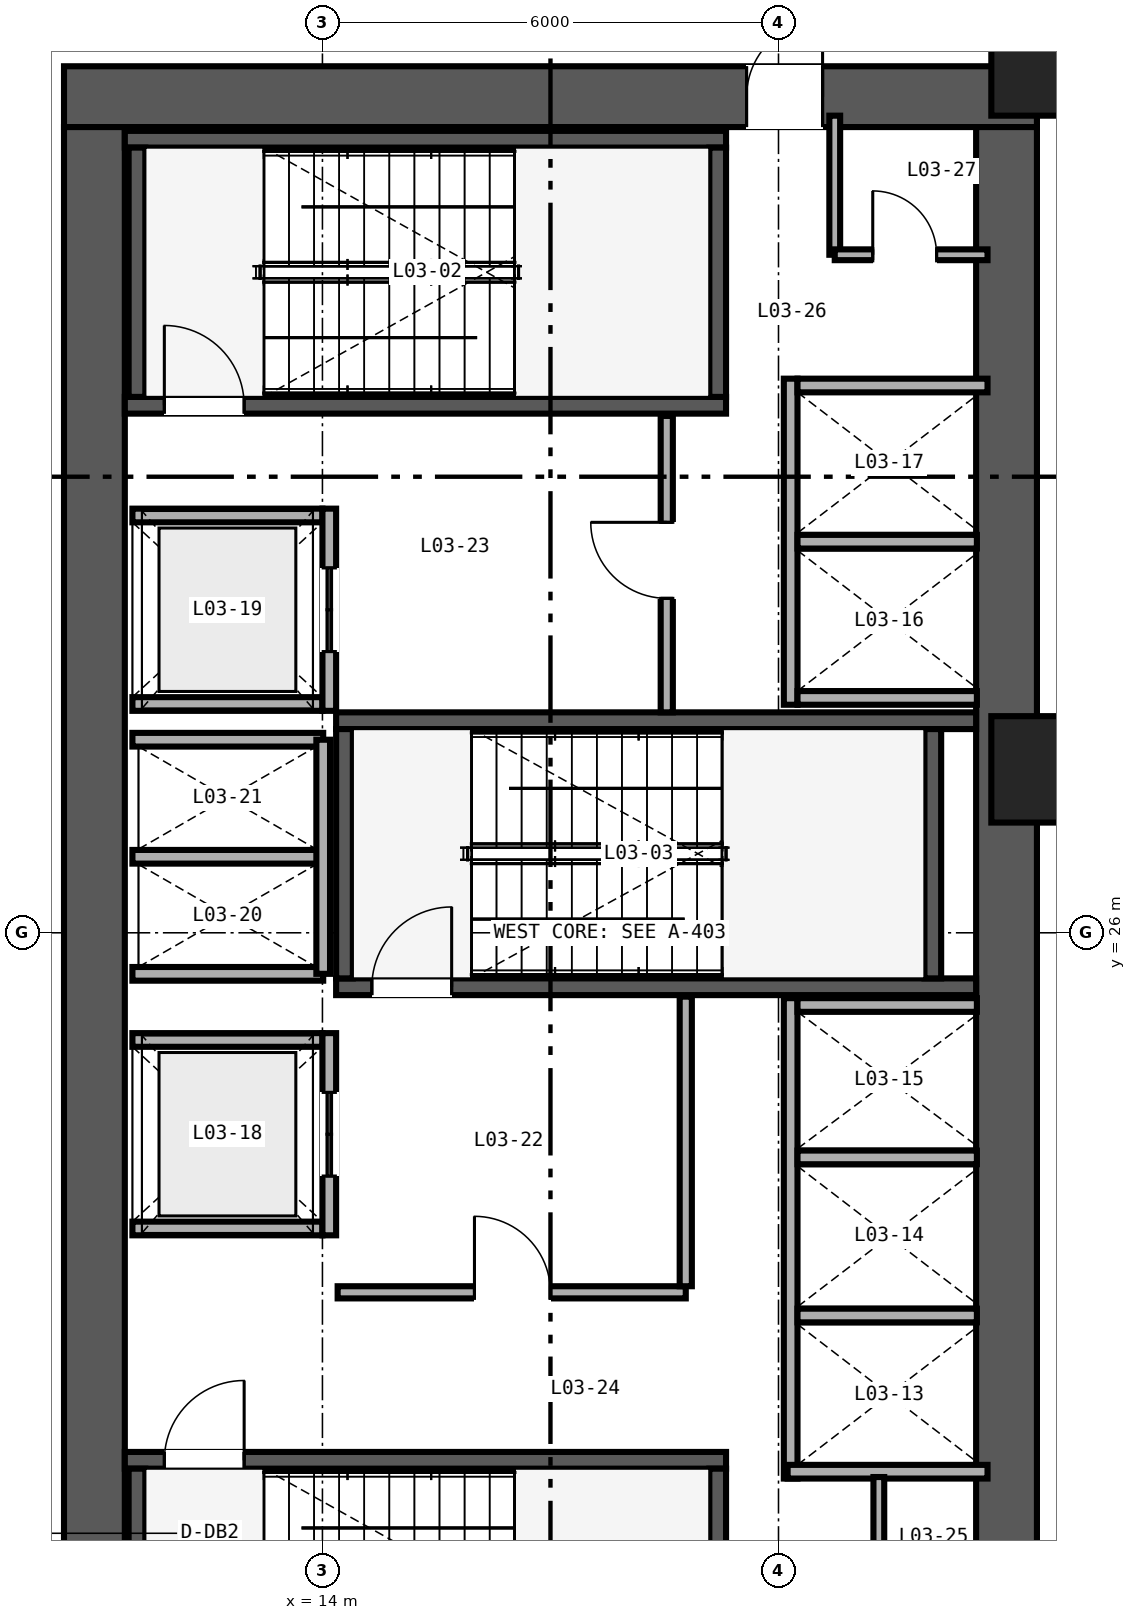
"""IFC4 building model, lengths in metres.
Left out: names, types, materials, properties, quantities, classifications, styles, units other than length and angle.
Written with IfcOpenShell. Run it as: python <this file> out.ifc"""

import sys

from ifc_helpers import new_model, si_unit, direction, frame, frame_2d, origin, origin_2d, place, context, subcontext, project, spatial, rectangle, extrude, source, transform, mapped, element, fill, save


model = new_model("IFC4")
c1 = context("Model", 3, precision=1e-05, world=origin(), true_north=direction((0.0, 1.0)))
c2 = subcontext(c1, "Body", "Model", "MODEL_VIEW")
j1 = project(units=[si_unit("LENGTHUNIT", "METRE"), si_unit("PLANEANGLEUNIT", "RADIAN")], contexts=[c1])
p1 = place(None, origin())
s1 = spatial("IfcSite", under=j1, at=p1, CompositionType="ELEMENT")
p2 = place(p1, origin())
s2 = spatial("IfcBuilding", under=s1, at=p2, CompositionType="ELEMENT")
p3 = place(p2, frame((0.0, 0.0, 11.4)))
s3 = spatial("IfcBuildingStorey", under=s2, at=p3, CompositionType="ELEMENT", Elevation=11.4)
p4 = place(p3, frame((10.6, 37.0, 0.0), z_axis=(0.0, 0.0, 1.0), x_axis=(1.0, 0.0, 0.0)))
e1 = element("IfcWall", 1, at=p4, inside=s3, PredefinedType="SHEAR", context=c2, shape_type="SweptSolid", body=[
    extrude(rectangle(XDim=12.8, YDim=0.8, at=frame_2d((6.4, 0.0))), origin(), (0.0, 0.0, 1.0), 7.51),
])
p5 = place(p4, frame((8.98, 0.0, 0.0)))
e2 = element("IfcOpeningElement", 2, at=p5, cuts=e1, PredefinedType="OPENING", context=c2, shape_type="SweptSolid", body=[
    extrude(rectangle(XDim=1.0, YDim=2.15, at=frame_2d((0.5, 1.075))), frame((0.0, 0.41, 0.0), z_axis=(0.0, -1.0, 0.0), x_axis=(1.0, 0.0, 0.0)), (0.0, 0.0, 1.0), 0.82),
])
for number, where, z_axis, x_axis in (
    (3, (11.0, 15.4, 0.0), (0.0, 0.0, 1.0), (0.0, 1.0, 0.0)),
    (4, (23.0, 15.4, 0.0), (0.0, 0.0, 1.0), (0.0, 1.0, 0.0)),
):
    element("IfcWall", number, at=place(p3, frame(where, z_axis=z_axis, x_axis=x_axis)), inside=s3, PredefinedType="SHEAR", context=c2, shape_type="SweptSolid", body=[
        extrude(rectangle(XDim=21.2, YDim=0.8, at=frame_2d((10.6, 0.0))), origin(), (0.0, 0.0, 1.0), 7.51),
    ])
p6 = place(p3, frame((11.4, 19.06, 0.0), z_axis=(0.0, 0.0, 1.0), x_axis=(1.0, 0.0, 0.0)))
e5 = element("IfcWall", 5, at=p6, inside=s3, PredefinedType="SHEAR", context=c2, shape_type="SweptSolid", body=[
    extrude(rectangle(XDim=7.91, YDim=0.22, at=frame_2d((3.955, 0.0))), origin(), (0.0, 0.0, 1.0), 7.6),
])
p7 = place(p6, frame((0.52, 0.0, 0.0)))
e6 = element("IfcOpeningElement", 6, at=p7, cuts=e5, PredefinedType="OPENING", context=c2, shape_type="SweptSolid", body=[
    extrude(rectangle(XDim=1.05, YDim=2.15, at=frame_2d((0.525, 1.075))), frame((0.0, 0.12, 0.0), z_axis=(0.0, -1.0, 0.0), x_axis=(1.0, 0.0, 0.0)), (0.0, 0.0, 1.0), 0.24),
])
for number, where, z_axis, x_axis in (
    (7, (11.56, 15.67, 0.0), (0.0, 0.0, 1.0), (0.0, 1.0, 0.0)),
    (8, (19.2, 15.67, 0.0), (0.0, 0.0, 1.0), (0.0, 1.0, 0.0)),
):
    element("IfcWall", number, at=place(p3, frame(where, z_axis=z_axis, x_axis=x_axis)), inside=s3, PredefinedType="SHEAR", context=c2, shape_type="SweptSolid", body=[
        extrude(rectangle(XDim=3.28, YDim=0.22, at=frame_2d((1.64, 0.0))), origin(), (0.0, 0.0, 1.0), 7.6),
    ])
p8 = place(p3, frame((11.4, 32.94, 0.0), z_axis=(0.0, 0.0, 1.0), x_axis=(1.0, 0.0, 0.0)))
e9 = element("IfcWall", 9, at=p8, inside=s3, PredefinedType="SHEAR", context=c2, shape_type="SweptSolid", body=[
    extrude(rectangle(XDim=7.91, YDim=0.22, at=frame_2d((3.955, 0.0))), origin(), (0.0, 0.0, 1.0), 7.6),
])
p9 = place(p8, frame((0.52, 0.0, 0.0)))
e10 = element("IfcOpeningElement", 10, at=p9, cuts=e9, PredefinedType="OPENING", context=c2, shape_type="SweptSolid", body=[
    extrude(rectangle(XDim=1.05, YDim=2.15, at=frame_2d((0.525, 1.075))), frame((0.0, 0.12, 0.0), z_axis=(0.0, -1.0, 0.0), x_axis=(1.0, 0.0, 0.0)), (0.0, 0.0, 1.0), 0.24),
])
p10 = place(p3, frame((11.4, 36.44, 0.0), z_axis=(0.0, 0.0, 1.0), x_axis=(1.0, 0.0, 0.0)))
e11 = element("IfcWall", 11, at=p10, inside=s3, PredefinedType="SHEAR", context=c2, shape_type="SweptSolid", body=[
    extrude(rectangle(XDim=7.91, YDim=0.22, at=frame_2d((3.955, 0.0))), origin(), (0.0, 0.0, 1.0), 7.6),
])
for number, where, z_axis, x_axis in (
    (12, (11.56, 33.05, 0.0), (0.0, 0.0, 1.0), (0.0, 1.0, 0.0)),
    (13, (19.2, 33.05, 0.0), (0.0, 0.0, 1.0), (0.0, 1.0, 0.0)),
):
    element("IfcWall", number, at=place(p3, frame(where, z_axis=z_axis, x_axis=x_axis)), inside=s3, PredefinedType="SHEAR", context=c2, shape_type="SweptSolid", body=[
        extrude(rectangle(XDim=3.28, YDim=0.22, at=frame_2d((1.64, 0.0))), origin(), (0.0, 0.0, 1.0), 7.6),
    ])
p11 = place(p3, frame((14.18, 25.29, 0.0), z_axis=(0.0, 0.0, 1.0), x_axis=(1.0, 0.0, 0.0)))
e14 = element("IfcWall", 14, at=p11, inside=s3, PredefinedType="SHEAR", context=c2, shape_type="SweptSolid", body=[
    extrude(rectangle(XDim=8.42, YDim=0.22, at=frame_2d((4.21, 0.0))), origin(), (0.0, 0.0, 1.0), 7.6),
])
p12 = place(p11, frame((0.47, 0.0, 0.0)))
e15 = element("IfcOpeningElement", 15, at=p12, cuts=e14, PredefinedType="OPENING", context=c2, shape_type="SweptSolid", body=[
    extrude(rectangle(XDim=1.05, YDim=2.15, at=frame_2d((0.525, 1.075))), frame((0.0, 0.12, 0.0), z_axis=(0.0, -1.0, 0.0), x_axis=(1.0, 0.0, 0.0)), (0.0, 0.0, 1.0), 0.24),
])
p13 = place(p3, frame((14.18, 28.79, 0.0), z_axis=(0.0, 0.0, 1.0), x_axis=(1.0, 0.0, 0.0)))
e16 = element("IfcWall", 16, at=p13, inside=s3, PredefinedType="SHEAR", context=c2, shape_type="SweptSolid", body=[
    extrude(rectangle(XDim=8.42, YDim=0.22, at=frame_2d((4.21, 0.0))), origin(), (0.0, 0.0, 1.0), 7.6),
])
for number, where, z_axis, x_axis in (
    (17, (14.29, 25.4, 0.0), (0.0, 0.0, 1.0), (0.0, 1.0, 0.0)),
    (18, (22.03, 25.4, 0.0), (0.0, 0.0, 1.0), (0.0, 1.0, 0.0)),
):
    element("IfcWall", number, at=place(p3, frame(where, z_axis=z_axis, x_axis=x_axis)), inside=s3, PredefinedType="SHEAR", context=c2, shape_type="SweptSolid", body=[
        extrude(rectangle(XDim=3.28, YDim=0.22, at=frame_2d((1.64, 0.0))), origin(), (0.0, 0.0, 1.0), 7.6),
    ])
m1 = source(origin(), c2, "Body", "SweptSolid", [
    extrude(rectangle(XDim=1.4, YDim=1.4, at=origin_2d()), origin(), (0.0, 0.0, 1.0), 7.51),
])
for number, where, z_axis, x_axis in (
    (19, (23.5, 28.15, 0.0), (0.0, 0.0, 1.0), (1.0, 0.0, 0.0)),
    (20, (23.5, 37.45, 0.0), (0.0, 0.0, 1.0), (1.0, 0.0, 0.0)),
):
    element("IfcColumn", number, at=place(p3, frame(where, z_axis=z_axis, x_axis=x_axis)), inside=s3, PredefinedType="COLUMN", context=c2, shape_type="MappedRepresentation", body=[
        mapped(m1, transform((0.0, 0.0, 0.0), scale=1.0)),
    ])
p14 = place(p3, frame((20.16, 18.82, 0.0), z_axis=(0.0, 0.0, 1.0), x_axis=(0.0, 1.0, 0.0)))
e21 = element("IfcWall", 21, at=p14, inside=s3, PredefinedType="SOLIDWALL", context=c2, shape_type="SweptSolid", body=[
    extrude(rectangle(XDim=6.32, YDim=0.18, at=frame_2d((3.16, 0.0))), origin(), (0.0, 0.0, 1.0), 6.41),
])
p15 = place(p3, frame((20.12, 18.91, 0.0), z_axis=(0.0, 0.0, 1.0), x_axis=(1.0, 0.0, 0.0)))
e22 = element("IfcWall", 22, at=p15, inside=s3, PredefinedType="SOLIDWALL", context=c2, shape_type="SweptSolid", body=[
    extrude(rectangle(XDim=2.63, YDim=0.18, at=frame_2d((1.315, 0.0))), origin(), (0.0, 0.0, 1.0), 7.51),
])
p16 = place(p3, frame((20.25, 25.05, 0.0), z_axis=(0.0, 0.0, 1.0), x_axis=(1.0, 0.0, 0.0)))
e23 = element("IfcWall", 23, at=p16, inside=s3, PredefinedType="SOLIDWALL", context=c2, shape_type="SweptSolid", body=[
    extrude(rectangle(XDim=2.36, YDim=0.18, at=frame_2d((1.18, 0.0))), origin(), (0.0, 0.0, 1.0), 7.51),
])
p17 = place(p3, frame((20.25, 20.965, 0.0), z_axis=(0.0, 0.0, 1.0), x_axis=(1.0, 0.0, 0.0)))
e24 = element("IfcWall", 24, at=p17, inside=s3, PredefinedType="SOLIDWALL", context=c2, shape_type="SweptSolid", body=[
    extrude(rectangle(XDim=2.36, YDim=0.18, at=frame_2d((1.18, 0.0))), origin(), (0.0, 0.0, 1.0), 6.41),
])
p18 = place(p3, frame((20.25, 23.045, 0.0), z_axis=(0.0, 0.0, 1.0), x_axis=(1.0, 0.0, 0.0)))
e25 = element("IfcWall", 25, at=p18, inside=s3, PredefinedType="SOLIDWALL", context=c2, shape_type="SweptSolid", body=[
    extrude(rectangle(XDim=2.36, YDim=0.18, at=frame_2d((1.18, 0.0))), origin(), (0.0, 0.0, 1.0), 7.51),
])
p19 = place(p3, frame((20.16, 29.0, 0.0), z_axis=(0.0, 0.0, 1.0), x_axis=(0.0, 1.0, 0.0)))
e26 = element("IfcWall", 26, at=p19, inside=s3, PredefinedType="SOLIDWALL", context=c2, shape_type="SweptSolid", body=[
    extrude(rectangle(XDim=4.29, YDim=0.18, at=frame_2d((2.145, 0.0))), origin(), (0.0, 0.0, 1.0), 7.51),
])
p20 = place(p3, frame((20.25, 29.09, 0.0), z_axis=(0.0, 0.0, 1.0), x_axis=(1.0, 0.0, 0.0)))
e27 = element("IfcWall", 27, at=p20, inside=s3, PredefinedType="SOLIDWALL", context=c2, shape_type="SweptSolid", body=[
    extrude(rectangle(XDim=2.36, YDim=0.18, at=frame_2d((1.18, 0.0))), origin(), (0.0, 0.0, 1.0), 7.51),
])
p21 = place(p3, frame((20.25, 33.2, 0.0), z_axis=(0.0, 0.0, 1.0), x_axis=(1.0, 0.0, 0.0)))
e28 = element("IfcWall", 28, at=p21, inside=s3, PredefinedType="SOLIDWALL", context=c2, shape_type="SweptSolid", body=[
    extrude(rectangle(XDim=2.5, YDim=0.18, at=frame_2d((1.25, 0.0))), origin(), (0.0, 0.0, 1.0), 7.51),
])
p22 = place(p3, frame((20.25, 31.145, 0.0), z_axis=(0.0, 0.0, 1.0), x_axis=(1.0, 0.0, 0.0)))
e29 = element("IfcWall", 29, at=p22, inside=s3, PredefinedType="SOLIDWALL", context=c2, shape_type="SweptSolid", body=[
    extrude(rectangle(XDim=2.36, YDim=0.18, at=frame_2d((1.18, 0.0))), origin(), (0.0, 0.0, 1.0), 7.51),
])
for number, where, z_axis, x_axis in (
    (30, (11.5, 22.11, 0.0), (0.0, 0.0, 1.0), (1.0, 0.0, 0.0)),
    (31, (11.5, 24.59, 0.0), (0.0, 0.0, 1.0), (1.0, 0.0, 0.0)),
):
    element("IfcWall", number, at=place(p3, frame(where, z_axis=z_axis, x_axis=x_axis)), inside=s3, PredefinedType="SOLIDWALL", context=c2, shape_type="SweptSolid", body=[
        extrude(rectangle(XDim=2.5, YDim=0.18, at=frame_2d((1.25, 0.0))), origin(), (0.0, 0.0, 1.0), 7.51),
    ])
p23 = place(p3, frame((14.09, 22.02, 0.0), z_axis=(0.0, 0.0, 1.0), x_axis=(0.0, 1.0, 0.0)))
e32 = element("IfcWall", 32, at=p23, inside=s3, PredefinedType="SOLIDWALL", context=c2, shape_type="SweptSolid", body=[
    extrude(rectangle(XDim=2.66, YDim=0.18, at=frame_2d((1.33, 0.0))), origin(), (0.0, 0.0, 1.0), 7.51),
])
p24 = place(p23, frame((0.78, 0.0, 0.0)))
e33 = element("IfcOpeningElement", 33, at=p24, cuts=e32, PredefinedType="OPENING", context=c2, shape_type="SweptSolid", body=[
    extrude(rectangle(XDim=1.1, YDim=2.2, at=frame_2d((0.55, 1.1))), frame((0.0, 0.1, 0.0), z_axis=(0.0, -1.0, 0.0), x_axis=(1.0, 0.0, 0.0)), (0.0, 0.0, 1.0), 0.2),
])
for number, where, z_axis, x_axis in (
    (34, (11.5, 29.01, 0.0), (0.0, 0.0, 1.0), (1.0, 0.0, 0.0)),
    (35, (11.5, 31.49, 0.0), (0.0, 0.0, 1.0), (1.0, 0.0, 0.0)),
):
    element("IfcWall", number, at=place(p3, frame(where, z_axis=z_axis, x_axis=x_axis)), inside=s3, PredefinedType="SOLIDWALL", context=c2, shape_type="SweptSolid", body=[
        extrude(rectangle(XDim=2.5, YDim=0.18, at=frame_2d((1.25, 0.0))), origin(), (0.0, 0.0, 1.0), 7.51),
    ])
p25 = place(p3, frame((14.09, 28.92, 0.0), z_axis=(0.0, 0.0, 1.0), x_axis=(0.0, 1.0, 0.0)))
e36 = element("IfcWall", 36, at=p25, inside=s3, PredefinedType="SOLIDWALL", context=c2, shape_type="SweptSolid", body=[
    extrude(rectangle(XDim=2.66, YDim=0.18, at=frame_2d((1.33, 0.0))), origin(), (0.0, 0.0, 1.0), 7.51),
])
p26 = place(p25, frame((0.78, 0.0, 0.0)))
e37 = element("IfcOpeningElement", 37, at=p26, cuts=e36, PredefinedType="OPENING", context=c2, shape_type="SweptSolid", body=[
    extrude(rectangle(XDim=1.1, YDim=2.2, at=frame_2d((0.55, 1.1))), frame((0.0, 0.1, 0.0), z_axis=(0.0, -1.0, 0.0), x_axis=(1.0, 0.0, 0.0)), (0.0, 0.0, 1.0), 0.2),
])
for number, where, z_axis, x_axis in (
    (38, (11.5, 25.46, 0.0), (0.0, 0.0, 1.0), (1.0, 0.0, 0.0)),
    (39, (11.5, 27.0, 0.0), (0.0, 0.0, 1.0), (1.0, 0.0, 0.0)),
    (40, (11.5, 28.54, 0.0), (0.0, 0.0, 1.0), (1.0, 0.0, 0.0)),
):
    element("IfcWall", number, at=place(p3, frame(where, z_axis=z_axis, x_axis=x_axis)), inside=s3, PredefinedType="SOLIDWALL", context=c2, shape_type="SweptSolid", body=[
        extrude(rectangle(XDim=2.51, YDim=0.18, at=frame_2d((1.255, 0.0))), origin(), (0.0, 0.0, 1.0), 7.51),
    ])
p27 = place(p3, frame((14.01, 25.46, 0.0), z_axis=(0.0, 0.0, 1.0), x_axis=(0.0, 1.0, 0.0)))
e41 = element("IfcWall", 41, at=p27, inside=s3, PredefinedType="SOLIDWALL", context=c2, shape_type="SweptSolid", body=[
    extrude(rectangle(XDim=3.08, YDim=0.18, at=frame_2d((1.54, 0.0))), origin(), (0.0, 0.0, 1.0), 7.51),
])
p28 = place(p3, frame((14.2, 21.27, 0.0), z_axis=(0.0, 0.0, 1.0), x_axis=(1.0, 0.0, 0.0)))
e42 = element("IfcWall", 42, at=p28, inside=s3, PredefinedType="PARTITIONING", context=c2, shape_type="SweptSolid", body=[
    extrude(rectangle(XDim=4.58, YDim=0.16, at=frame_2d((2.29, 0.0))), origin(), (0.0, 0.0, 1.0), 7.51),
])
p29 = place(p28, frame((1.8, 0.0, 0.0)))
e43 = element("IfcOpeningElement", 43, at=p29, cuts=e42, PredefinedType="OPENING", context=c2, shape_type="SweptSolid", body=[
    extrude(rectangle(XDim=1.0, YDim=2.15, at=frame_2d((0.5, 1.075))), frame((0.0, 0.09, 0.0), z_axis=(0.0, -1.0, 0.0), x_axis=(1.0, 0.0, 0.0)), (0.0, 0.0, 1.0), 0.18),
])
p30 = place(p3, frame((18.78, 21.35, 0.0), z_axis=(0.0, 0.0, 1.0), x_axis=(0.0, 1.0, 0.0)))
e44 = element("IfcWall", 44, at=p30, inside=s3, PredefinedType="PARTITIONING", context=c2, shape_type="SweptSolid", body=[
    extrude(rectangle(XDim=3.81, YDim=0.16, at=frame_2d((1.905, 0.0))), origin(), (0.0, 0.0, 1.0), 7.51),
])
p31 = place(p3, frame((18.53, 28.9, 0.0), z_axis=(0.0, 0.0, 1.0), x_axis=(0.0, 1.0, 0.0)))
e45 = element("IfcWall", 45, at=p31, inside=s3, PredefinedType="PARTITIONING", context=c2, shape_type="SweptSolid", body=[
    extrude(rectangle(XDim=3.9, YDim=0.16, at=frame_2d((1.95, 0.0))), origin(), (0.0, 0.0, 1.0), 7.51),
])
p32 = place(p31, frame((1.5, 0.0, 0.0)))
e46 = element("IfcOpeningElement", 46, at=p32, cuts=e45, PredefinedType="OPENING", context=c2, shape_type="SweptSolid", body=[
    extrude(rectangle(XDim=1.0, YDim=2.15, at=frame_2d((0.5, 1.075))), frame((0.0, 0.09, 0.0), z_axis=(0.0, -1.0, 0.0), x_axis=(1.0, 0.0, 0.0)), (0.0, 0.0, 1.0), 0.18),
])
p33 = place(p3, frame((21.32, 15.25, 0.0), z_axis=(0.0, 0.0, 1.0), x_axis=(0.0, 1.0, 0.0)))
e47 = element("IfcWall", 47, at=p33, inside=s3, PredefinedType="PARTITIONING", context=c2, shape_type="SweptSolid", body=[
    extrude(rectangle(XDim=3.59, YDim=0.142, at=frame_2d((1.795, 0.0))), origin(), (0.0, 0.0, 1.0), 7.51),
])
p34 = place(p33, frame((1.25, 0.0, 0.0)))
e48 = element("IfcOpeningElement", 48, at=p34, cuts=e47, PredefinedType="OPENING", context=c2, shape_type="SweptSolid", body=[
    extrude(rectangle(XDim=0.84, YDim=2.1, at=frame_2d((0.42, 1.05))), frame((0.0, 0.081, 0.0), z_axis=(0.0, -1.0, 0.0), x_axis=(1.0, 0.0, 0.0)), (0.0, 0.0, 1.0), 0.162),
])
p35 = place(p3, frame((20.74, 34.92, 0.0), z_axis=(0.0, 0.0, 1.0), x_axis=(0.0, 1.0, 0.0)))
e49 = element("IfcWall", 49, at=p35, inside=s3, PredefinedType="PARTITIONING", context=c2, shape_type="SweptSolid", body=[
    extrude(rectangle(XDim=1.83, YDim=0.142, at=frame_2d((0.915, 0.0))), origin(), (0.0, 0.0, 1.0), 7.51),
])
p36 = place(p3, frame((20.74, 34.92, 0.0), z_axis=(0.0, 0.0, 1.0), x_axis=(1.0, 0.0, 0.0)))
e50 = element("IfcWall", 50, at=p36, inside=s3, PredefinedType="PARTITIONING", context=c2, shape_type="SweptSolid", body=[
    extrude(rectangle(XDim=2.01, YDim=0.142, at=frame_2d((1.005, 0.0))), origin(), (0.0, 0.0, 1.0), 7.51),
])
p37 = place(p36, frame((0.5, 0.0, 0.0)))
e51 = element("IfcOpeningElement", 51, at=p37, cuts=e50, PredefinedType="OPENING", context=c2, shape_type="SweptSolid", body=[
    extrude(rectangle(XDim=0.84, YDim=2.1, at=frame_2d((0.42, 1.05))), frame((0.0, 0.081, 0.0), z_axis=(0.0, -1.0, 0.0), x_axis=(1.0, 0.0, 0.0)), (0.0, 0.0, 1.0), 0.162),
])
m2 = source(origin(), c2, "Body", "SweptSolid", [
    extrude(rectangle(XDim=1.05, YDim=2.15, at=frame_2d((0.525, 1.075))), frame((0.0, 0.025, 0.0), z_axis=(0.0, -1.0, 0.0), x_axis=(1.0, 0.0, 0.0)), (0.0, 0.0, 1.0), 0.05),
])
p38 = place(p7, origin())
e52 = element("IfcDoor", 52, at=p38, inside=s3, OperationType="SINGLE_SWING_RIGHT", PredefinedType="DOOR", context=c2, shape_type="MappedRepresentation", body=[
    mapped(m2, transform((0.0, 0.0, 0.0), scale=1.0)),
])
fill(e6, e52)
p39 = place(p9, origin())
e53 = element("IfcDoor", 53, at=p39, inside=s3, OperationType="SINGLE_SWING_LEFT", PredefinedType="DOOR", context=c2, shape_type="MappedRepresentation", body=[
    mapped(m2, transform((0.0, 0.0, 0.0), scale=1.0)),
])
fill(e10, e53)
p40 = place(p12, origin())
e54 = element("IfcDoor", 54, at=p40, inside=s3, OperationType="SINGLE_SWING_RIGHT", PredefinedType="DOOR", context=c2, shape_type="MappedRepresentation", body=[
    mapped(m2, transform((0.0, 0.0, 0.0), scale=1.0)),
])
fill(e15, e54)
m3 = source(origin(), c2, "Body", "SweptSolid", [
    extrude(rectangle(XDim=1.1, YDim=2.2, at=frame_2d((0.55, 1.1))), frame((0.0, 0.025, 0.0), z_axis=(0.0, -1.0, 0.0), x_axis=(1.0, 0.0, 0.0)), (0.0, 0.0, 1.0), 0.05),
])
p41 = place(p24, origin())
e55 = element("IfcDoor", 55, at=p41, inside=s3, OperationType="DOUBLE_DOOR_SLIDING", PredefinedType="DOOR", context=c2, shape_type="MappedRepresentation", body=[
    mapped(m3, transform((0.0, 0.0, 0.0), scale=1.0)),
])
fill(e33, e55)
p42 = place(p26, origin())
e56 = element("IfcDoor", 56, at=p42, inside=s3, OperationType="DOUBLE_DOOR_SLIDING", PredefinedType="DOOR", context=c2, shape_type="MappedRepresentation", body=[
    mapped(m3, transform((0.0, 0.0, 0.0), scale=1.0)),
])
fill(e37, e56)
m4 = source(origin(), c2, "Body", "SweptSolid", [
    extrude(rectangle(XDim=1.0, YDim=2.15, at=frame_2d((0.5, 1.075))), frame((0.0, 0.025, 0.0), z_axis=(0.0, -1.0, 0.0), x_axis=(1.0, 0.0, 0.0)), (0.0, 0.0, 1.0), 0.05),
])
p43 = place(p29, origin())
e57 = element("IfcDoor", 57, at=p43, inside=s3, OperationType="SINGLE_SWING_LEFT", PredefinedType="DOOR", context=c2, shape_type="MappedRepresentation", body=[
    mapped(m4, transform((0.0, 0.0, 0.0), scale=1.0)),
])
fill(e43, e57)
p44 = place(p32, origin())
e58 = element("IfcDoor", 58, at=p44, inside=s3, OperationType="SINGLE_SWING_RIGHT", PredefinedType="DOOR", context=c2, shape_type="MappedRepresentation", body=[
    mapped(m4, transform((0.0, 0.0, 0.0), scale=1.0)),
])
fill(e46, e58)
m5 = source(origin(), c2, "Body", "SweptSolid", [
    extrude(rectangle(XDim=0.84, YDim=2.1, at=frame_2d((0.42, 1.05))), frame((0.0, 0.025, 0.0), z_axis=(0.0, -1.0, 0.0), x_axis=(1.0, 0.0, 0.0)), (0.0, 0.0, 1.0), 0.05),
])
p45 = place(p37, origin())
e59 = element("IfcDoor", 59, at=p45, inside=s3, OperationType="SINGLE_SWING_LEFT", PredefinedType="DOOR", context=c2, shape_type="MappedRepresentation", body=[
    mapped(m5, transform((0.0, 0.0, 0.0), scale=1.0)),
])
fill(e51, e59)
p46 = place(p5, origin())
e60 = element("IfcDoor", 60, at=p46, inside=s3, OperationType="SINGLE_SWING_RIGHT", PredefinedType="DOOR", context=c2, shape_type="MappedRepresentation", body=[
    mapped(m4, transform((0.0, 0.0, 0.0), scale=1.0)),
])
fill(e2, e60)
save(model, sys.argv[1])
